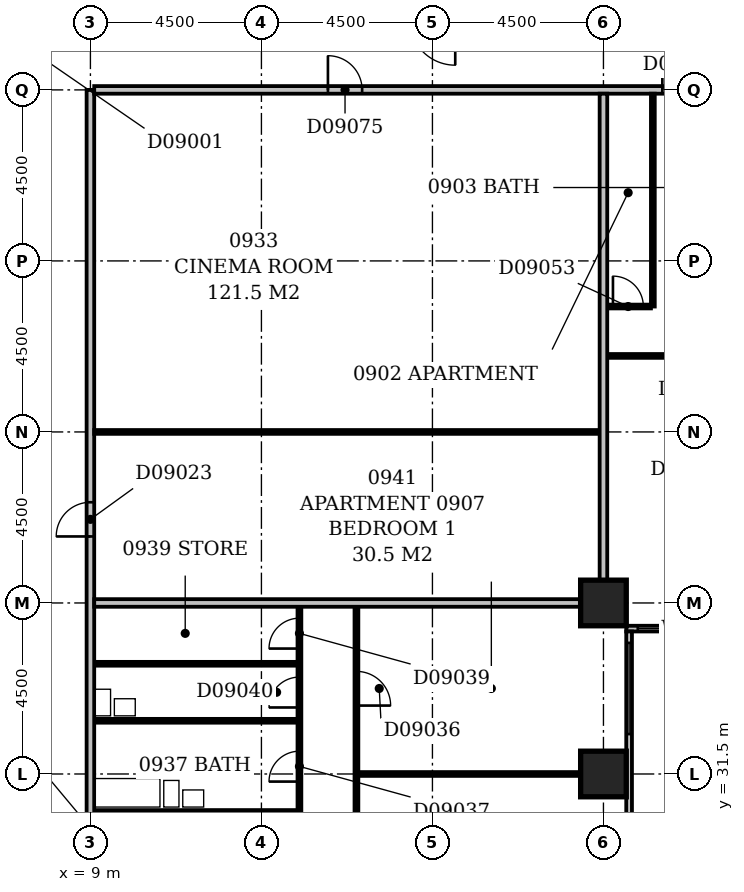
"""IFC4 building model, lengths in metres.
Left out: names, types, materials, properties, quantities, classifications, styles, units other than length and angle.
Written with IfcOpenShell. Run it as: python <this file> out.ifc"""

import sys

from ifc_helpers import new_model, si_unit, direction, frame, frame_2d, origin, origin_2d, place, context, subcontext, project, spatial, rectangle, extrude, element, fill, save


model = new_model("IFC4")
c1 = context("Model", 3, precision=1e-05, world=origin(), true_north=direction((0.0, 1.0)))
c2 = subcontext(c1, "Body", "Model", "MODEL_VIEW")
j1 = project(units=[si_unit("LENGTHUNIT", "METRE"), si_unit("PLANEANGLEUNIT", "RADIAN")], contexts=[c1])
p1 = place(None, origin())
s1 = spatial("IfcSite", under=j1, at=p1, CompositionType="ELEMENT")
p2 = place(p1, origin())
s2 = spatial("IfcBuilding", under=s1, at=p2, CompositionType="ELEMENT")
p3 = place(p2, frame((0.0, 0.0, 43.4)))
s3 = spatial("IfcBuildingStorey", under=s2, at=p3, CompositionType="ELEMENT", Elevation=43.4)
for number, where, z_axis, x_axis in (
    (1, (22.5, 31.5, -0.3), (0.0, 0.0, 1.0), (1.0, 0.0, 0.0)),
    (2, (22.5, 36.0, -0.3), (0.0, 0.0, 1.0), (1.0, 0.0, 0.0)),
):
    element("IfcColumn", number, at=place(p3, frame(where, z_axis=z_axis, x_axis=x_axis)), inside=s3, PredefinedType="COLUMN", context=c2, shape_type="SweptSolid", body=[
        extrude(rectangle(XDim=1.2, YDim=1.2, at=origin_2d()), origin(), (0.0, 0.0, 1.0), 3.6),
    ])
p4 = place(p3, frame((23.175, 17.4, 0.0), z_axis=(0.0, 0.0, 1.0), x_axis=(0.0, 1.0, 0.0)))
e3 = element("IfcWall", 3, at=p4, inside=s3, PredefinedType="STANDARD", context=c2, shape_type="SweptSolid", body=[
    extrude(rectangle(XDim=17.85, YDim=0.15, at=frame_2d((8.925, 0.0))), origin(), (0.0, 0.0, 1.0), 2.7),
])
p5 = place(p4, frame((1.548, 0.0, 0.6)))
e4 = element("IfcOpeningElement", 4, at=p5, cuts=e3, PredefinedType="OPENING", context=c2, shape_type="SweptSolid", body=[
    extrude(rectangle(XDim=1.8, YDim=1.8, at=frame_2d((0.9, 0.9))), frame((0.0, 0.087, 0.0), z_axis=(0.0, -1.0, 0.0), x_axis=(1.0, 0.0, 0.0)), (0.0, 0.0, 1.0), 0.174),
])
p6 = place(p4, frame((6.15, 0.0, 0.6)))
e5 = element("IfcOpeningElement", 5, at=p6, cuts=e3, PredefinedType="OPENING", context=c2, shape_type="SweptSolid", body=[
    extrude(rectangle(XDim=2.4, YDim=1.8, at=frame_2d((1.2, 0.9))), frame((0.0, 0.087, 0.0), z_axis=(0.0, -1.0, 0.0), x_axis=(1.0, 0.0, 0.0)), (0.0, 0.0, 1.0), 0.174),
])
p7 = place(p4, frame((10.65, 0.0, 0.6)))
e6 = element("IfcOpeningElement", 6, at=p7, cuts=e3, PredefinedType="OPENING", context=c2, shape_type="SweptSolid", body=[
    extrude(rectangle(XDim=2.4, YDim=1.8, at=frame_2d((1.2, 0.9))), frame((0.0, 0.087, 0.0), z_axis=(0.0, -1.0, 0.0), x_axis=(1.0, 0.0, 0.0)), (0.0, 0.0, 1.0), 0.174),
])
p8 = place(p4, frame((15.15, 0.0, 0.6)))
e7 = element("IfcOpeningElement", 7, at=p8, cuts=e3, PredefinedType="OPENING", context=c2, shape_type="SweptSolid", body=[
    extrude(rectangle(XDim=2.4, YDim=1.8, at=frame_2d((1.2, 0.9))), frame((0.0, 0.087, 0.0), z_axis=(0.0, -1.0, 0.0), x_axis=(1.0, 0.0, 0.0)), (0.0, 0.0, 1.0), 0.174),
])
p9 = place(p3, frame((23.1, 35.325, 0.0), z_axis=(0.0, 0.0, 1.0), x_axis=(1.0, 0.0, 0.0)))
e8 = element("IfcWall", 8, at=p9, inside=s3, PredefinedType="STANDARD", context=c2, shape_type="SweptSolid", body=[
    extrude(rectangle(XDim=45.15, YDim=0.15, at=frame_2d((22.575, 0.0))), origin(), (0.0, 0.0, 1.0), 2.7),
])
p10 = place(p9, frame((0.303, 0.0, 0.6)))
e9 = element("IfcOpeningElement", 9, at=p10, cuts=e8, PredefinedType="OPENING", context=c2, shape_type="SweptSolid", body=[
    extrude(rectangle(XDim=2.1, YDim=1.8, at=frame_2d((1.05, 0.9))), frame((0.0, 0.087, 0.0), z_axis=(0.0, -1.0, 0.0), x_axis=(1.0, 0.0, 0.0)), (0.0, 0.0, 1.0), 0.174),
])
p11 = place(p9, frame((4.95, 0.0, 0.6)))
e10 = element("IfcOpeningElement", 10, at=p11, cuts=e8, PredefinedType="OPENING", context=c2, shape_type="SweptSolid", body=[
    extrude(rectangle(XDim=2.4, YDim=1.8, at=frame_2d((1.2, 0.9))), frame((0.0, 0.087, 0.0), z_axis=(0.0, -1.0, 0.0), x_axis=(1.0, 0.0, 0.0)), (0.0, 0.0, 1.0), 0.174),
])
p12 = place(p9, frame((9.45, 0.0, 0.6)))
e11 = element("IfcOpeningElement", 11, at=p12, cuts=e8, PredefinedType="OPENING", context=c2, shape_type="SweptSolid", body=[
    extrude(rectangle(XDim=2.4, YDim=1.8, at=frame_2d((1.2, 0.9))), frame((0.0, 0.087, 0.0), z_axis=(0.0, -1.0, 0.0), x_axis=(1.0, 0.0, 0.0)), (0.0, 0.0, 1.0), 0.174),
])
p13 = place(p9, frame((13.95, 0.0, 0.6)))
e12 = element("IfcOpeningElement", 12, at=p13, cuts=e8, PredefinedType="OPENING", context=c2, shape_type="SweptSolid", body=[
    extrude(rectangle(XDim=2.4, YDim=1.8, at=frame_2d((1.2, 0.9))), frame((0.0, 0.087, 0.0), z_axis=(0.0, -1.0, 0.0), x_axis=(1.0, 0.0, 0.0)), (0.0, 0.0, 1.0), 0.174),
])
p14 = place(p9, frame((18.45, 0.0, 0.6)))
e13 = element("IfcOpeningElement", 13, at=p14, cuts=e8, PredefinedType="OPENING", context=c2, shape_type="SweptSolid", body=[
    extrude(rectangle(XDim=2.4, YDim=1.8, at=frame_2d((1.2, 0.9))), frame((0.0, 0.087, 0.0), z_axis=(0.0, -1.0, 0.0), x_axis=(1.0, 0.0, 0.0)), (0.0, 0.0, 1.0), 0.174),
])
p15 = place(p9, frame((24.277, 0.0, 0.6)))
e14 = element("IfcOpeningElement", 14, at=p15, cuts=e8, PredefinedType="OPENING", context=c2, shape_type="SweptSolid", body=[
    extrude(rectangle(XDim=1.2, YDim=1.8, at=frame_2d((0.6, 0.9))), frame((0.0, 0.087, 0.0), z_axis=(0.0, -1.0, 0.0), x_axis=(1.0, 0.0, 0.0)), (0.0, 0.0, 1.0), 0.174),
])
p16 = place(p9, frame((27.297, 0.0, 0.6)))
e15 = element("IfcOpeningElement", 15, at=p16, cuts=e8, PredefinedType="OPENING", context=c2, shape_type="SweptSolid", body=[
    extrude(rectangle(XDim=2.1, YDim=1.8, at=frame_2d((1.05, 0.9))), frame((0.0, 0.087, 0.0), z_axis=(0.0, -1.0, 0.0), x_axis=(1.0, 0.0, 0.0)), (0.0, 0.0, 1.0), 0.174),
])
p17 = place(p9, frame((31.95, 0.0, 0.6)))
e16 = element("IfcOpeningElement", 16, at=p17, cuts=e8, PredefinedType="OPENING", context=c2, shape_type="SweptSolid", body=[
    extrude(rectangle(XDim=2.4, YDim=1.8, at=frame_2d((1.2, 0.9))), frame((0.0, 0.087, 0.0), z_axis=(0.0, -1.0, 0.0), x_axis=(1.0, 0.0, 0.0)), (0.0, 0.0, 1.0), 0.174),
])
p18 = place(p9, frame((36.45, 0.0, 0.6)))
e17 = element("IfcOpeningElement", 17, at=p18, cuts=e8, PredefinedType="OPENING", context=c2, shape_type="SweptSolid", body=[
    extrude(rectangle(XDim=2.4, YDim=1.8, at=frame_2d((1.2, 0.9))), frame((0.0, 0.087, 0.0), z_axis=(0.0, -1.0, 0.0), x_axis=(1.0, 0.0, 0.0)), (0.0, 0.0, 1.0), 0.174),
])
p19 = place(p9, frame((40.95, 0.0, 0.6)))
e18 = element("IfcOpeningElement", 18, at=p19, cuts=e8, PredefinedType="OPENING", context=c2, shape_type="SweptSolid", body=[
    extrude(rectangle(XDim=2.4, YDim=1.8, at=frame_2d((1.2, 0.9))), frame((0.0, 0.087, 0.0), z_axis=(0.0, -1.0, 0.0), x_axis=(1.0, 0.0, 0.0)), (0.0, 0.0, 1.0), 0.174),
])
p20 = place(p3, frame((9.0, 5.0, 0.0), z_axis=(0.0, 0.0, 1.0), x_axis=(0.0, 1.0, 0.0)))
e19 = element("IfcWall", 19, at=p20, inside=s3, PredefinedType="PARTITIONING", context=c2, shape_type="SweptSolid", body=[
    extrude(rectangle(XDim=44.5, YDim=0.2, at=frame_2d((22.25, 0.0))), origin(), (0.0, 0.0, 1.0), 3.3),
])
p21 = place(p20, frame((17.8, 0.0, 0.0)))
e20 = element("IfcOpeningElement", 20, at=p21, cuts=e19, PredefinedType="OPENING", context=c2, shape_type="SweptSolid", body=[
    extrude(rectangle(XDim=1.0, YDim=2.1, at=frame_2d((0.5, 1.05))), frame((0.0, 0.112, 0.0), z_axis=(0.0, -1.0, 0.0), x_axis=(1.0, 0.0, 0.0)), (0.0, 0.0, 1.0), 0.224),
])
p22 = place(p20, frame((14.95, 0.0, 0.0)))
e21 = element("IfcOpeningElement", 21, at=p22, cuts=e19, PredefinedType="OPENING", context=c2, shape_type="SweptSolid", body=[
    extrude(rectangle(XDim=1.0, YDim=2.1, at=frame_2d((0.5, 1.05))), frame((0.0, 0.112, 0.0), z_axis=(0.0, -1.0, 0.0), x_axis=(1.0, 0.0, 0.0)), (0.0, 0.0, 1.0), 0.224),
])
p23 = place(p20, frame((10.45, 0.0, 0.0)))
e22 = element("IfcOpeningElement", 22, at=p23, cuts=e19, PredefinedType="OPENING", context=c2, shape_type="SweptSolid", body=[
    extrude(rectangle(XDim=1.0, YDim=2.1, at=frame_2d((0.5, 1.05))), frame((0.0, 0.112, 0.0), z_axis=(0.0, -1.0, 0.0), x_axis=(1.0, 0.0, 0.0)), (0.0, 0.0, 1.0), 0.224),
])
p24 = place(p20, frame((5.95, 0.0, 0.0)))
e23 = element("IfcOpeningElement", 23, at=p24, cuts=e19, PredefinedType="OPENING", context=c2, shape_type="SweptSolid", body=[
    extrude(rectangle(XDim=1.0, YDim=2.1, at=frame_2d((0.5, 1.05))), frame((0.0, 0.112, 0.0), z_axis=(0.0, -1.0, 0.0), x_axis=(1.0, 0.0, 0.0)), (0.0, 0.0, 1.0), 0.224),
])
p25 = place(p20, frame((32.75, 0.0, 0.0)))
e24 = element("IfcOpeningElement", 24, at=p25, cuts=e19, PredefinedType="OPENING", context=c2, shape_type="SweptSolid", body=[
    extrude(rectangle(XDim=0.9, YDim=2.1, at=frame_2d((0.45, 1.05))), frame((0.0, 0.112, 0.0), z_axis=(0.0, -1.0, 0.0), x_axis=(1.0, 0.0, 0.0)), (0.0, 0.0, 1.0), 0.224),
])
p26 = place(p20, frame((1.5, 0.0, 0.0)))
e25 = element("IfcOpeningElement", 25, at=p26, cuts=e19, PredefinedType="OPENING", context=c2, shape_type="SweptSolid", body=[
    extrude(rectangle(XDim=0.9, YDim=2.1, at=frame_2d((0.45, 1.05))), frame((0.0, 0.112, 0.0), z_axis=(0.0, -1.0, 0.0), x_axis=(1.0, 0.0, 0.0)), (0.0, 0.0, 1.0), 0.224),
])
p27 = place(p3, frame((16.0, 22.6, 0.0), z_axis=(0.0, 0.0, 1.0), x_axis=(0.0, 1.0, 0.0)))
e26 = element("IfcWall", 26, at=p27, inside=s3, PredefinedType="PARTITIONING", context=c2, shape_type="SweptSolid", body=[
    extrude(rectangle(XDim=13.3, YDim=0.1, at=frame_2d((6.65, 0.0))), origin(), (0.0, 0.0, 1.0), 3.3),
])
p28 = place(p27, frame((3.9, 0.0, 0.0)))
e27 = element("IfcOpeningElement", 27, at=p28, cuts=e26, PredefinedType="OPENING", context=c2, shape_type="SweptSolid", body=[
    extrude(rectangle(XDim=0.9, YDim=2.1, at=frame_2d((0.45, 1.05))), frame((0.0, 0.062, 0.0), z_axis=(0.0, -1.0, 0.0), x_axis=(1.0, 0.0, 0.0)), (0.0, 0.0, 1.0), 0.124),
])
p29 = place(p27, frame((10.7, 0.0, 0.0)))
e28 = element("IfcOpeningElement", 28, at=p29, cuts=e26, PredefinedType="OPENING", context=c2, shape_type="SweptSolid", body=[
    extrude(rectangle(XDim=0.9, YDim=2.1, at=frame_2d((0.45, 1.05))), frame((0.0, 0.062, 0.0), z_axis=(0.0, -1.0, 0.0), x_axis=(1.0, 0.0, 0.0)), (0.0, 0.0, 1.0), 0.124),
])
p30 = place(p3, frame((14.5, 24.1, 0.0), z_axis=(0.0, 0.0, 1.0), x_axis=(0.0, 1.0, 0.0)))
e29 = element("IfcWall", 29, at=p30, inside=s3, PredefinedType="PARTITIONING", context=c2, shape_type="SweptSolid", body=[
    extrude(rectangle(XDim=11.8, YDim=0.1, at=frame_2d((5.9, 0.0))), origin(), (0.0, 0.0, 1.0), 3.3),
])
p31 = place(p30, frame((7.2, 0.0, 0.0)))
e30 = element("IfcOpeningElement", 30, at=p31, cuts=e29, PredefinedType="OPENING", context=c2, shape_type="SweptSolid", body=[
    extrude(rectangle(XDim=0.8, YDim=2.1, at=frame_2d((0.4, 1.05))), frame((0.0, 0.062, 0.0), z_axis=(0.0, -1.0, 0.0), x_axis=(1.0, 0.0, 0.0)), (0.0, 0.0, 1.0), 0.124),
])
p32 = place(p30, frame((2.75, 0.0, 0.0)))
e31 = element("IfcOpeningElement", 31, at=p32, cuts=e29, PredefinedType="OPENING", context=c2, shape_type="SweptSolid", body=[
    extrude(rectangle(XDim=0.9, YDim=2.1, at=frame_2d((0.45, 1.05))), frame((0.0, 0.062, 0.0), z_axis=(0.0, -1.0, 0.0), x_axis=(1.0, 0.0, 0.0)), (0.0, 0.0, 1.0), 0.124),
])
p33 = place(p30, frame((10.7, 0.0, 0.0)))
e32 = element("IfcOpeningElement", 32, at=p33, cuts=e29, PredefinedType="OPENING", context=c2, shape_type="SweptSolid", body=[
    extrude(rectangle(XDim=0.8, YDim=2.1, at=frame_2d((0.4, 1.05))), frame((0.0, 0.062, 0.0), z_axis=(0.0, -1.0, 0.0), x_axis=(1.0, 0.0, 0.0)), (0.0, 0.0, 1.0), 0.124),
])
p34 = place(p30, frame((9.15, 0.0, 0.0)))
e33 = element("IfcOpeningElement", 33, at=p34, cuts=e29, PredefinedType="OPENING", context=c2, shape_type="SweptSolid", body=[
    extrude(rectangle(XDim=0.8, YDim=2.1, at=frame_2d((0.4, 1.05))), frame((0.0, 0.062, 0.0), z_axis=(0.0, -1.0, 0.0), x_axis=(1.0, 0.0, 0.0)), (0.0, 0.0, 1.0), 0.124),
])
p35 = place(p3, frame((9.1, 30.5, 0.0), z_axis=(0.0, 0.0, 1.0), x_axis=(1.0, 0.0, 0.0)))
e34 = element("IfcWall", 34, at=p35, inside=s3, PredefinedType="PLUMBINGWALL", context=c2, shape_type="SweptSolid", body=[
    extrude(rectangle(XDim=5.35, YDim=0.1, at=frame_2d((2.675, 0.0))), origin(), (0.0, 0.0, 1.0), 3.3),
])
p36 = place(p3, frame((16.05, 31.5, 0.0), z_axis=(0.0, 0.0, 1.0), x_axis=(1.0, 0.0, 0.0)))
e35 = element("IfcWall", 35, at=p36, inside=s3, PredefinedType="PARTITIONING", context=c2, shape_type="SweptSolid", body=[
    extrude(rectangle(XDim=5.85, YDim=0.1, at=frame_2d((2.925, 0.0))), origin(), (0.0, 0.0, 1.0), 3.3),
])
for number, where, z_axis, x_axis in (
    (36, (9.1, 32.9, 0.0), (0.0, 0.0, 1.0), (1.0, 0.0, 0.0)),
    (37, (9.1, 34.4, 0.0), (0.0, 0.0, 1.0), (1.0, 0.0, 0.0)),
):
    element("IfcWall", number, at=place(p3, frame(where, z_axis=z_axis, x_axis=x_axis)), inside=s3, PredefinedType="PLUMBINGWALL", context=c2, shape_type="SweptSolid", body=[
        extrude(rectangle(XDim=5.35, YDim=0.1, at=frame_2d((2.675, 0.0))), origin(), (0.0, 0.0, 1.0), 3.3),
    ])
p37 = place(p3, frame((9.1, 36.0, 0.0), z_axis=(0.0, 0.0, 1.0), x_axis=(1.0, 0.0, 0.0)))
e38 = element("IfcWall", 38, at=p37, inside=s3, PredefinedType="PARTITIONING", context=c2, shape_type="SweptSolid", body=[
    extrude(rectangle(XDim=12.8, YDim=0.2, at=frame_2d((6.4, 0.0))), origin(), (0.0, 0.0, 1.0), 2.4),
])
p38 = place(p3, frame((22.5, 36.6, 0.0), z_axis=(0.0, 0.0, 1.0), x_axis=(0.0, 1.0, 0.0)))
e39 = element("IfcWall", 39, at=p38, inside=s3, PredefinedType="PARTITIONING", context=c2, shape_type="SweptSolid", body=[
    extrude(rectangle(XDim=12.8, YDim=0.2, at=frame_2d((6.4, 0.0))), origin(), (0.0, 0.0, 1.0), 3.3),
])
p39 = place(p3, frame((9.1, 40.5, 0.0), z_axis=(0.0, 0.0, 1.0), x_axis=(1.0, 0.0, 0.0)))
e40 = element("IfcWall", 40, at=p39, inside=s3, PredefinedType="PARTITIONING", context=c2, shape_type="SweptSolid", body=[
    extrude(rectangle(XDim=13.3, YDim=0.1, at=frame_2d((6.65, 0.0))), origin(), (0.0, 0.0, 1.0), 3.3),
])
p40 = place(p3, frame((22.6, 42.5, 0.0), z_axis=(0.0, 0.0, 1.0), x_axis=(1.0, 0.0, 0.0)))
e41 = element("IfcWall", 41, at=p40, inside=s3, PredefinedType="PARTITIONING", context=c2, shape_type="SweptSolid", body=[
    extrude(rectangle(XDim=4.3, YDim=0.1, at=frame_2d((2.15, 0.0))), origin(), (0.0, 0.0, 1.0), 3.3),
])
p41 = place(p40, frame((1.7, 0.0, 0.0)))
e42 = element("IfcOpeningElement", 42, at=p41, cuts=e41, PredefinedType="OPENING", context=c2, shape_type="SweptSolid", body=[
    extrude(rectangle(XDim=0.9, YDim=2.1, at=frame_2d((0.45, 1.05))), frame((0.0, 0.062, 0.0), z_axis=(0.0, -1.0, 0.0), x_axis=(1.0, 0.0, 0.0)), (0.0, 0.0, 1.0), 0.124),
])
p42 = place(p3, frame((22.6, 43.8, 0.0), z_axis=(0.0, 0.0, 1.0), x_axis=(1.0, 0.0, 0.0)))
e43 = element("IfcWall", 43, at=p42, inside=s3, PredefinedType="PARTITIONING", context=c2, shape_type="SweptSolid", body=[
    extrude(rectangle(XDim=1.15, YDim=0.1, at=frame_2d((0.575, 0.0))), origin(), (0.0, 0.0, 1.0), 3.3),
])
p43 = place(p42, frame((0.15, 0.0, 0.0)))
e44 = element("IfcOpeningElement", 44, at=p43, cuts=e43, PredefinedType="OPENING", context=c2, shape_type="SweptSolid", body=[
    extrude(rectangle(XDim=0.8, YDim=2.1, at=frame_2d((0.4, 1.05))), frame((0.0, 0.062, 0.0), z_axis=(0.0, -1.0, 0.0), x_axis=(1.0, 0.0, 0.0)), (0.0, 0.0, 1.0), 0.124),
])
p44 = place(p3, frame((23.8, 43.8, 0.0), z_axis=(0.0, 0.0, 1.0), x_axis=(0.0, 1.0, 0.0)))
e45 = element("IfcWall", 45, at=p44, inside=s3, PredefinedType="PARTITIONING", context=c2, shape_type="SweptSolid", body=[
    extrude(rectangle(XDim=5.6, YDim=0.1, at=frame_2d((2.8, 0.0))), origin(), (0.0, 0.0, 1.0), 3.3),
])
p45 = place(p3, frame((9.1, 49.5, 0.0), z_axis=(0.0, 0.0, 1.0), x_axis=(1.0, 0.0, 0.0)))
e46 = element("IfcWall", 46, at=p45, inside=s3, PredefinedType="PARTITIONING", context=c2, shape_type="SweptSolid", body=[
    extrude(rectangle(XDim=57.8, YDim=0.2, at=frame_2d((28.9, 0.0))), origin(), (0.0, 0.0, 1.0), 3.3),
])
p46 = place(p45, frame((14.95, 0.0, 0.0)))
e47 = element("IfcOpeningElement", 47, at=p46, cuts=e46, PredefinedType="OPENING", context=c2, shape_type="SweptSolid", body=[
    extrude(rectangle(XDim=1.0, YDim=2.1, at=frame_2d((0.5, 1.05))), frame((0.0, 0.112, 0.0), z_axis=(0.0, -1.0, 0.0), x_axis=(1.0, 0.0, 0.0)), (0.0, 0.0, 1.0), 0.224),
])
p47 = place(p45, frame((19.85, 0.0, 0.0)))
e48 = element("IfcOpeningElement", 48, at=p47, cuts=e46, PredefinedType="OPENING", context=c2, shape_type="SweptSolid", body=[
    extrude(rectangle(XDim=1.0, YDim=2.1, at=frame_2d((0.5, 1.05))), frame((0.0, 0.112, 0.0), z_axis=(0.0, -1.0, 0.0), x_axis=(1.0, 0.0, 0.0)), (0.0, 0.0, 1.0), 0.224),
])
p48 = place(p45, frame((22.7, 0.0, 0.0)))
e49 = element("IfcOpeningElement", 49, at=p48, cuts=e46, PredefinedType="OPENING", context=c2, shape_type="SweptSolid", body=[
    extrude(rectangle(XDim=1.0, YDim=2.1, at=frame_2d((0.5, 1.05))), frame((0.0, 0.112, 0.0), z_axis=(0.0, -1.0, 0.0), x_axis=(1.0, 0.0, 0.0)), (0.0, 0.0, 1.0), 0.224),
])
p49 = place(p45, frame((33.35, 0.0, 0.0)))
e50 = element("IfcOpeningElement", 50, at=p49, cuts=e46, PredefinedType="OPENING", context=c2, shape_type="SweptSolid", body=[
    extrude(rectangle(XDim=1.0, YDim=2.1, at=frame_2d((0.5, 1.05))), frame((0.0, 0.112, 0.0), z_axis=(0.0, -1.0, 0.0), x_axis=(1.0, 0.0, 0.0)), (0.0, 0.0, 1.0), 0.224),
])
p50 = place(p45, frame((36.2, 0.0, 0.0)))
e51 = element("IfcOpeningElement", 51, at=p50, cuts=e46, PredefinedType="OPENING", context=c2, shape_type="SweptSolid", body=[
    extrude(rectangle(XDim=1.0, YDim=2.1, at=frame_2d((0.5, 1.05))), frame((0.0, 0.112, 0.0), z_axis=(0.0, -1.0, 0.0), x_axis=(1.0, 0.0, 0.0)), (0.0, 0.0, 1.0), 0.224),
])
p51 = place(p45, frame((54.15, 0.0, 0.0)))
e52 = element("IfcOpeningElement", 52, at=p51, cuts=e46, PredefinedType="OPENING", context=c2, shape_type="SweptSolid", body=[
    extrude(rectangle(XDim=1.0, YDim=2.1, at=frame_2d((0.5, 1.05))), frame((0.0, 0.112, 0.0), z_axis=(0.0, -1.0, 0.0), x_axis=(1.0, 0.0, 0.0)), (0.0, 0.0, 1.0), 0.224),
])
p52 = place(p45, frame((6.15, 0.0, 0.0)))
e53 = element("IfcOpeningElement", 53, at=p52, cuts=e46, PredefinedType="OPENING", context=c2, shape_type="SweptSolid", body=[
    extrude(rectangle(XDim=0.9, YDim=2.1, at=frame_2d((0.45, 1.05))), frame((0.0, 0.112, 0.0), z_axis=(0.0, -1.0, 0.0), x_axis=(1.0, 0.0, 0.0)), (0.0, 0.0, 1.0), 0.224),
])
p53 = place(p8, origin())
e54 = element("IfcWindow", 54, at=p53, inside=s3, PartitioningType="SINGLE_PANEL", PredefinedType="WINDOW", context=c2, shape_type="SweptSolid", body=[
    extrude(rectangle(XDim=2.4, YDim=1.8, at=frame_2d((1.2, 0.9))), frame((0.0, 0.03, 0.0), z_axis=(0.0, -1.0, 0.0), x_axis=(1.0, 0.0, 0.0)), (0.0, 0.0, 1.0), 0.06),
])
fill(e7, e54)
p54 = place(p10, origin())
e55 = element("IfcWindow", 55, at=p54, inside=s3, PartitioningType="SINGLE_PANEL", PredefinedType="WINDOW", context=c2, shape_type="SweptSolid", body=[
    extrude(rectangle(XDim=2.1, YDim=1.8, at=frame_2d((1.05, 0.9))), frame((0.0, 0.03, 0.0), z_axis=(0.0, -1.0, 0.0), x_axis=(1.0, 0.0, 0.0)), (0.0, 0.0, 1.0), 0.06),
])
fill(e9, e55)
p55 = place(p25, origin())
e56 = element("IfcDoor", 56, at=p55, inside=s3, OperationType="SINGLE_SWING_LEFT", PredefinedType="DOOR", context=c2, shape_type="SweptSolid", body=[
    extrude(rectangle(XDim=0.9, YDim=2.1, at=frame_2d((0.45, 1.05))), frame((0.0, 0.025, 0.0), z_axis=(0.0, -1.0, 0.0), x_axis=(1.0, 0.0, 0.0)), (0.0, 0.0, 1.0), 0.05),
])
fill(e24, e56)
p56 = place(p29, frame((0.9, 0.0, 0.0), z_axis=(0.0, 0.0, 1.0), x_axis=(-1.0, 0.0, 0.0)))
e57 = element("IfcDoor", 57, at=p56, inside=s3, OperationType="SINGLE_SWING_RIGHT", PredefinedType="DOOR", context=c2, shape_type="SweptSolid", body=[
    extrude(rectangle(XDim=0.9, YDim=2.1, at=frame_2d((0.45, 1.05))), frame((0.0, 0.025, 0.0), z_axis=(0.0, -1.0, 0.0), x_axis=(1.0, 0.0, 0.0)), (0.0, 0.0, 1.0), 0.05),
])
fill(e28, e57)
p57 = place(p31, origin())
e58 = element("IfcDoor", 58, at=p57, inside=s3, OperationType="SINGLE_SWING_LEFT", PredefinedType="DOOR", context=c2, shape_type="SweptSolid", body=[
    extrude(rectangle(XDim=0.8, YDim=2.1, at=frame_2d((0.4, 1.05))), frame((0.0, 0.025, 0.0), z_axis=(0.0, -1.0, 0.0), x_axis=(1.0, 0.0, 0.0)), (0.0, 0.0, 1.0), 0.05),
])
fill(e30, e58)
p58 = place(p33, origin())
e59 = element("IfcDoor", 59, at=p58, inside=s3, OperationType="SINGLE_SWING_LEFT", PredefinedType="DOOR", context=c2, shape_type="SweptSolid", body=[
    extrude(rectangle(XDim=0.8, YDim=2.1, at=frame_2d((0.4, 1.05))), frame((0.0, 0.025, 0.0), z_axis=(0.0, -1.0, 0.0), x_axis=(1.0, 0.0, 0.0)), (0.0, 0.0, 1.0), 0.05),
])
fill(e32, e59)
p59 = place(p34, origin())
e60 = element("IfcDoor", 60, at=p59, inside=s3, OperationType="SINGLE_SWING_LEFT", PredefinedType="DOOR", context=c2, shape_type="SweptSolid", body=[
    extrude(rectangle(XDim=0.8, YDim=2.1, at=frame_2d((0.4, 1.05))), frame((0.0, 0.025, 0.0), z_axis=(0.0, -1.0, 0.0), x_axis=(1.0, 0.0, 0.0)), (0.0, 0.0, 1.0), 0.05),
])
fill(e33, e60)
p60 = place(p43, origin())
e61 = element("IfcDoor", 61, at=p60, inside=s3, OperationType="SINGLE_SWING_LEFT", PredefinedType="DOOR", context=c2, shape_type="SweptSolid", body=[
    extrude(rectangle(XDim=0.8, YDim=2.1, at=frame_2d((0.4, 1.05))), frame((0.0, 0.025, 0.0), z_axis=(0.0, -1.0, 0.0), x_axis=(1.0, 0.0, 0.0)), (0.0, 0.0, 1.0), 0.05),
])
fill(e44, e61)
p61 = place(p46, origin())
e62 = element("IfcDoor", 62, at=p61, inside=s3, OperationType="SINGLE_SWING_LEFT", PredefinedType="DOOR", context=c2, shape_type="SweptSolid", body=[
    extrude(rectangle(XDim=1.0, YDim=2.1, at=frame_2d((0.5, 1.05))), frame((0.0, 0.025, 0.0), z_axis=(0.0, -1.0, 0.0), x_axis=(1.0, 0.0, 0.0)), (0.0, 0.0, 1.0), 0.05),
])
fill(e47, e62)
p62 = place(p52, origin())
e63 = element("IfcDoor", 63, at=p62, inside=s3, OperationType="SINGLE_SWING_LEFT", PredefinedType="DOOR", context=c2, shape_type="SweptSolid", body=[
    extrude(rectangle(XDim=0.9, YDim=2.1, at=frame_2d((0.45, 1.05))), frame((0.0, 0.025, 0.0), z_axis=(0.0, -1.0, 0.0), x_axis=(1.0, 0.0, 0.0)), (0.0, 0.0, 1.0), 0.05),
])
fill(e53, e63)
save(model, sys.argv[1])
